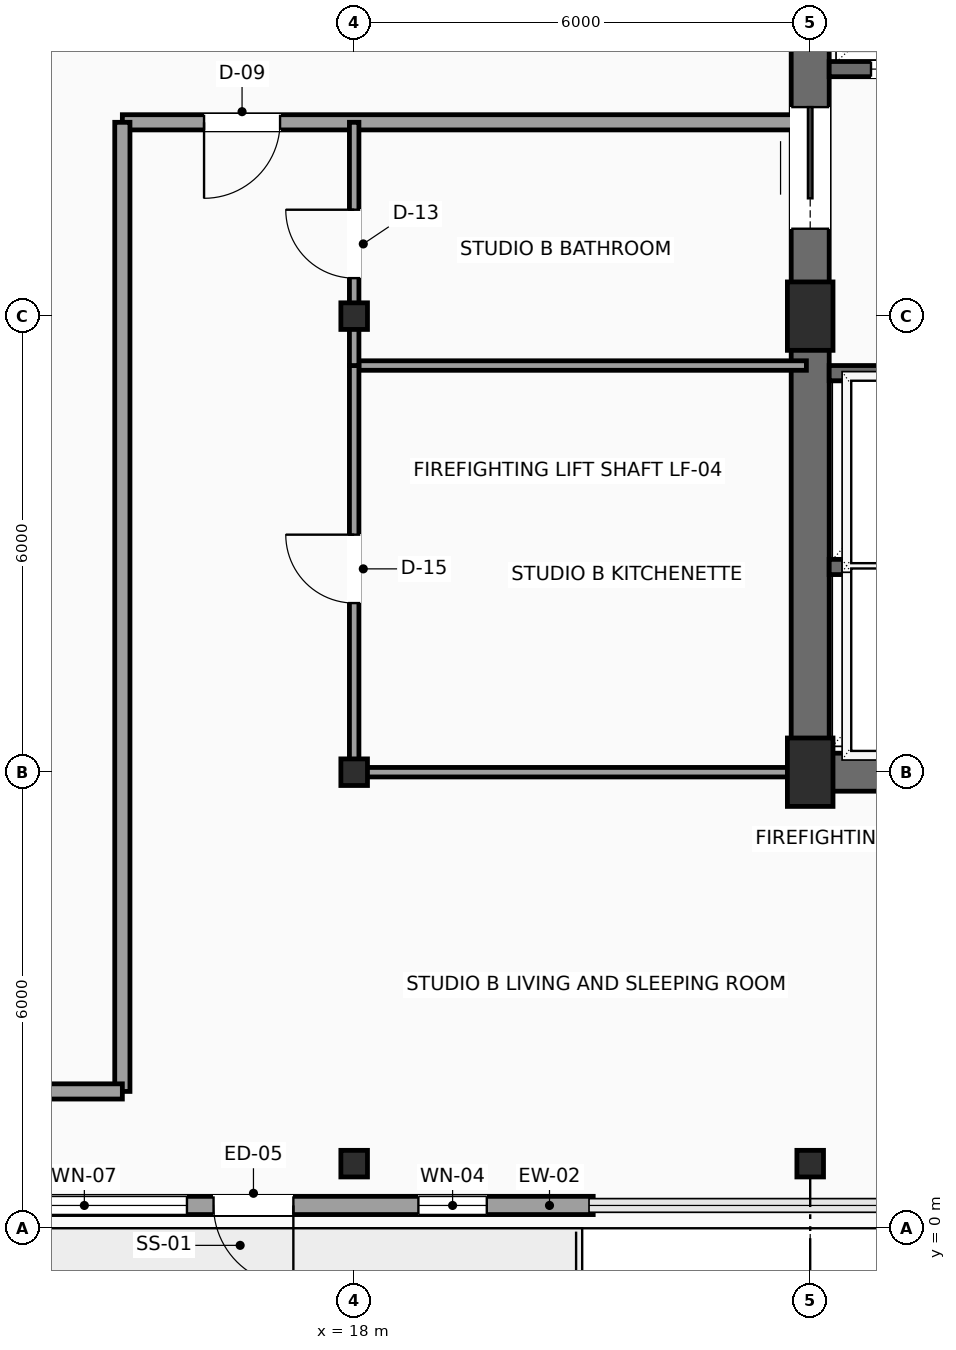
"""IFC4 building model, lengths in metres.
Left out: names, types, materials, properties, quantities, classifications, styles, units other than length and angle.
Written with IfcOpenShell. Run it as: python <this file> out.ifc"""

import sys

from ifc_helpers import new_model, si_unit, direction, frame, frame_2d, origin, origin_2d, place, context, subcontext, project, spatial, rectangle, hollow_rectangle, extrude, element, fill, save


model = new_model("IFC4")
c1 = context("Model", 3, precision=1e-05, world=origin(), true_north=direction((0.0, 1.0)))
c2 = subcontext(c1, "Body", "Model", "MODEL_VIEW")
j1 = project(units=[si_unit("LENGTHUNIT", "METRE"), si_unit("PLANEANGLEUNIT", "RADIAN")], contexts=[c1])
p1 = place(None, origin())
s1 = spatial("IfcSite", under=j1, at=p1, CompositionType="ELEMENT")
p2 = place(p1, origin())
s2 = spatial("IfcBuilding", under=s1, at=p2, CompositionType="ELEMENT")
p3 = place(p2, frame((0.0, 0.0, 239.7)))
s3 = spatial("IfcBuildingStorey", under=s2, at=p3, CompositionType="ELEMENT", Elevation=239.7)
for number, where, z_axis, x_axis in (
    (1, (24.0, 6.0, 0.0), (0.0, 0.0, 1.0), (1.0, 0.0, 0.0)),
    (2, (24.0, 12.0, 0.0), (0.0, 0.0, 1.0), (1.0, 0.0, 0.0)),
):
    element("IfcColumn", number, at=place(p3, frame(where, z_axis=z_axis, x_axis=x_axis)), inside=s3, PredefinedType="COLUMN", context=c2, shape_type="SweptSolid", body=[
        extrude(rectangle(XDim=0.6, YDim=0.9, at=origin_2d()), origin(), (0.0, 0.0, 1.0), 3.5),
    ])
for number, where, z_axis, x_axis in (
    (3, (18.0, 0.85, 0.0), (0.0, 0.0, 1.0), (1.0, 0.0, 0.0)),
    (4, (18.0, 6.0, 0.0), (0.0, 0.0, 1.0), (1.0, 0.0, 0.0)),
    (5, (18.0, 12.0, 0.0), (0.0, 0.0, 1.0), (1.0, 0.0, 0.0)),
    (6, (24.0, 0.85, 0.0), (0.0, 0.0, 1.0), (1.0, 0.0, 0.0)),
):
    element("IfcColumn", number, at=place(p3, frame(where, z_axis=z_axis, x_axis=x_axis)), inside=s3, PredefinedType="COLUMN", context=c2, shape_type="SweptSolid", body=[
        extrude(hollow_rectangle(XDim=0.35, YDim=0.35, WallThickness=0.016, InnerFilletRadius=0.016, OuterFilletRadius=0.032, at=origin_2d()), origin(), (0.0, 0.0, 1.0), 3.5),
    ])
p4 = place(p3, frame((21.145, 0.3, 0.0), z_axis=(0.0, 0.0, 1.0), x_axis=(-1.0, 0.0, 0.0)))
e7 = element("IfcWall", 7, at=p4, inside=s3, PredefinedType="SOLIDWALL", context=c2, shape_type="SweptSolid", body=[
    extrude(rectangle(XDim=9.29, YDim=0.24, at=frame_2d((4.645, 0.0))), origin(), (0.0, 0.0, 1.0), 3.3),
])
p5 = place(p4, frame((3.945, 0.0, 0.0)))
e8 = element("IfcOpeningElement", 8, at=p5, cuts=e7, PredefinedType="OPENING", context=c2, shape_type="SweptSolid", body=[
    extrude(rectangle(XDim=1.05, YDim=2.2, at=frame_2d((0.525, 1.1))), frame((0.0, 0.13, 0.0), z_axis=(0.0, -1.0, 0.0), x_axis=(1.0, 0.0, 0.0)), (0.0, 0.0, 1.0), 0.26),
])
p6 = place(p4, frame((5.345, 0.0, 0.6)))
e9 = element("IfcOpeningElement", 9, at=p6, cuts=e7, PredefinedType="OPENING", context=c2, shape_type="SweptSolid", body=[
    extrude(rectangle(XDim=2.7, YDim=2.3, at=frame_2d((1.35, 1.15))), frame((0.0, 0.13, 0.0), z_axis=(0.0, -1.0, 0.0), x_axis=(1.0, 0.0, 0.0)), (0.0, 0.0, 1.0), 0.26),
])
p7 = place(p4, frame((1.4, 0.0, 0.6)))
e10 = element("IfcOpeningElement", 10, at=p7, cuts=e7, PredefinedType="OPENING", context=c2, shape_type="SweptSolid", body=[
    extrude(rectangle(XDim=0.9, YDim=2.2, at=frame_2d((0.45, 1.1))), frame((0.0, 0.13, 0.0), z_axis=(0.0, -1.0, 0.0), x_axis=(1.0, 0.0, 0.0)), (0.0, 0.0, 1.0), 0.26),
])
p8 = place(p3, frame((24.0, 6.0, 0.0), z_axis=(0.0, 0.0, 1.0), x_axis=(1.0, 0.0, 0.0)))
e11 = element("IfcWall", 11, at=p8, inside=s3, PredefinedType="SHEAR", context=c2, shape_type="SweptSolid", body=[
    extrude(rectangle(XDim=9.6, YDim=0.5, at=frame_2d((4.8, 0.0))), origin(), (0.0, 0.0, 1.0), 3.3),
])
p9 = place(p3, frame((24.0, 6.0, 0.0), z_axis=(0.0, 0.0, 1.0), x_axis=(0.0, 1.0, 0.0)))
e12 = element("IfcWall", 12, at=p9, inside=s3, PredefinedType="SHEAR", context=c2, shape_type="SweptSolid", body=[
    extrude(rectangle(XDim=12.0, YDim=0.5, at=frame_2d((6.0, 0.0))), origin(), (0.0, 0.0, 1.0), 3.3),
])
p10 = place(p9, frame((7.15, 0.0, 0.0)))
e13 = element("IfcOpeningElement", 13, at=p10, cuts=e12, PredefinedType="OPENING", context=c2, shape_type="SweptSolid", body=[
    extrude(rectangle(XDim=1.6, YDim=2.3, at=frame_2d((0.8, 1.15))), frame((0.0, 0.26, 0.0), z_axis=(0.0, -1.0, 0.0), x_axis=(1.0, 0.0, 0.0)), (0.0, 0.0, 1.0), 0.52),
])
for number, where, z_axis, x_axis in (
    (14, (24.25, 8.7, 0.0), (0.0, 0.0, 1.0), (1.0, 0.0, 0.0)),
    (15, (24.25, 11.25, 0.0), (0.0, 0.0, 1.0), (1.0, 0.0, 0.0)),
):
    element("IfcWall", number, at=place(p3, frame(where, z_axis=z_axis, x_axis=x_axis)), inside=s3, PredefinedType="SHEAR", context=c2, shape_type="SweptSolid", body=[
        extrude(rectangle(XDim=2.17, YDim=0.2, at=frame_2d((1.085, 0.0))), origin(), (0.0, 0.0, 1.0), 3.3),
    ])
p11 = place(p3, frame((24.25, 15.25, 0.0), z_axis=(0.0, 0.0, 1.0), x_axis=(1.0, 0.0, 0.0)))
e16 = element("IfcWall", 16, at=p11, inside=s3, PredefinedType="SHEAR", context=c2, shape_type="SweptSolid", body=[
    extrude(rectangle(XDim=5.2, YDim=0.2, at=frame_2d((2.6, 0.0))), origin(), (0.0, 0.0, 1.0), 3.3),
])
p12 = place(p11, frame((0.55, 0.0, 0.0)))
e17 = element("IfcOpeningElement", 17, at=p12, cuts=e16, PredefinedType="OPENING", context=c2, shape_type="SweptSolid", body=[
    extrude(rectangle(XDim=1.2, YDim=2.2, at=frame_2d((0.6, 1.1))), frame((0.0, 0.11, 0.0), z_axis=(0.0, -1.0, 0.0), x_axis=(1.0, 0.0, 0.0)), (0.0, 0.0, 1.0), 0.22),
])
p13 = place(p11, frame((3.15, 0.0, 0.0)))
e18 = element("IfcOpeningElement", 18, at=p13, cuts=e16, PredefinedType="OPENING", context=c2, shape_type="SweptSolid", body=[
    extrude(rectangle(XDim=1.2, YDim=2.2, at=frame_2d((0.6, 1.1))), frame((0.0, 0.11, 0.0), z_axis=(0.0, -1.0, 0.0), x_axis=(1.0, 0.0, 0.0)), (0.0, 0.0, 1.0), 0.22),
])
p14 = place(p3, frame((23.95, 14.55, 0.0), z_axis=(0.0, 0.0, 1.0), x_axis=(-1.0, 0.0, 0.0)))
e19 = element("IfcWall", 19, at=p14, inside=s3, PredefinedType="PARTITIONING", context=c2, shape_type="SweptSolid", body=[
    extrude(rectangle(XDim=9.0, YDim=0.2, at=frame_2d((4.5, 0.0))), origin(), (0.0, 0.0, 1.0), 3.3),
])
p15 = place(p14, frame((6.925, 0.0, 0.0)))
e20 = element("IfcOpeningElement", 20, at=p15, cuts=e19, PredefinedType="OPENING", context=c2, shape_type="SweptSolid", body=[
    extrude(rectangle(XDim=1.0, YDim=2.2, at=frame_2d((0.5, 1.1))), frame((0.0, 0.11, 0.0), z_axis=(0.0, -1.0, 0.0), x_axis=(1.0, 0.0, 0.0)), (0.0, 0.0, 1.0), 0.22),
])
p16 = place(p3, frame((14.95, 14.55, 0.0), z_axis=(0.0, 0.0, 1.0), x_axis=(0.0, -1.0, 0.0)))
e21 = element("IfcWall", 21, at=p16, inside=s3, PredefinedType="PARTITIONING", context=c2, shape_type="SweptSolid", body=[
    extrude(rectangle(XDim=12.75, YDim=0.2, at=frame_2d((6.375, 0.0))), origin(), (0.0, 0.0, 1.0), 3.3),
])
p17 = place(p3, frame((14.95, 1.8, 0.0), z_axis=(0.0, 0.0, 1.0), x_axis=(-1.0, 0.0, 0.0)))
e22 = element("IfcWall", 22, at=p17, inside=s3, PredefinedType="PARTITIONING", context=c2, shape_type="SweptSolid", body=[
    extrude(rectangle(XDim=2.35, YDim=0.2, at=frame_2d((1.175, 0.0))), origin(), (0.0, 0.0, 1.0), 3.3),
])
p18 = place(p3, frame((18.0, 6.0, 0.0), z_axis=(0.0, 0.0, 1.0), x_axis=(1.0, 0.0, 0.0)))
e23 = element("IfcWall", 23, at=p18, inside=s3, PredefinedType="PARTITIONING", context=c2, shape_type="SweptSolid", body=[
    extrude(rectangle(XDim=5.95, YDim=0.125, at=frame_2d((2.975, 0.0))), origin(), (0.0, 0.0, 1.0), 2.992),
])
p19 = place(p3, frame((18.0, 11.35, 0.0), z_axis=(0.0, 0.0, 1.0), x_axis=(1.0, 0.0, 0.0)))
e24 = element("IfcWall", 24, at=p19, inside=s3, PredefinedType="PARTITIONING", context=c2, shape_type="SweptSolid", body=[
    extrude(rectangle(XDim=5.95, YDim=0.125, at=frame_2d((2.975, 0.0))), origin(), (0.0, 0.0, 1.0), 3.3),
])
p20 = place(p3, frame((18.0, 6.0, 0.0), z_axis=(0.0, 0.0, 1.0), x_axis=(0.0, 1.0, 0.0)))
e25 = element("IfcWall", 25, at=p20, inside=s3, PredefinedType="PARTITIONING", context=c2, shape_type="SweptSolid", body=[
    extrude(rectangle(XDim=5.35, YDim=0.125, at=frame_2d((2.675, 0.0))), origin(), (0.0, 0.0, 1.0), 2.992),
])
p21 = place(p20, frame((2.225, 0.0, 0.0)))
e26 = element("IfcOpeningElement", 26, at=p21, cuts=e25, PredefinedType="OPENING", context=c2, shape_type="SweptSolid", body=[
    extrude(rectangle(XDim=0.9, YDim=2.1, at=frame_2d((0.45, 1.05))), frame((0.0, 0.073, 0.0), z_axis=(0.0, -1.0, 0.0), x_axis=(1.0, 0.0, 0.0)), (0.0, 0.0, 1.0), 0.145),
])
p22 = place(p3, frame((18.0, 11.35, 0.0), z_axis=(0.0, 0.0, 1.0), x_axis=(0.0, 1.0, 0.0)))
e27 = element("IfcWall", 27, at=p22, inside=s3, PredefinedType="PARTITIONING", context=c2, shape_type="SweptSolid", body=[
    extrude(rectangle(XDim=3.2, YDim=0.125, at=frame_2d((1.6, 0.0))), origin(), (0.0, 0.0, 1.0), 2.992),
])
p23 = place(p22, frame((1.15, 0.0, 0.0)))
e28 = element("IfcOpeningElement", 28, at=p23, cuts=e27, PredefinedType="OPENING", context=c2, shape_type="SweptSolid", body=[
    extrude(rectangle(XDim=0.9, YDim=2.1, at=frame_2d((0.45, 1.05))), frame((0.0, 0.073, 0.0), z_axis=(0.0, -1.0, 0.0), x_axis=(1.0, 0.0, 0.0)), (0.0, 0.0, 1.0), 0.145),
])
p24 = place(p5, origin())
e29 = element("IfcDoor", 29, at=p24, inside=s3, OperationType="SINGLE_SWING_LEFT", PredefinedType="DOOR", context=c2, shape_type="SweptSolid", body=[
    extrude(rectangle(XDim=1.05, YDim=2.2, at=frame_2d((0.525, 1.1))), frame((0.0, 0.025, 0.0), z_axis=(0.0, -1.0, 0.0), x_axis=(1.0, 0.0, 0.0)), (0.0, 0.0, 1.0), 0.05),
])
fill(e8, e29)
p25 = place(p6, origin())
e30 = element("IfcWindow", 30, at=p25, inside=s3, PartitioningType="SINGLE_PANEL", PredefinedType="WINDOW", context=c2, shape_type="SweptSolid", body=[
    extrude(rectangle(XDim=2.7, YDim=2.3, at=frame_2d((1.35, 1.15))), frame((0.0, 0.03, 0.0), z_axis=(0.0, -1.0, 0.0), x_axis=(1.0, 0.0, 0.0)), (0.0, 0.0, 1.0), 0.06),
])
fill(e9, e30)
p26 = place(p7, origin())
e31 = element("IfcWindow", 31, at=p26, inside=s3, PartitioningType="SINGLE_PANEL", PredefinedType="WINDOW", context=c2, shape_type="SweptSolid", body=[
    extrude(rectangle(XDim=0.9, YDim=2.2, at=frame_2d((0.45, 1.1))), frame((0.0, 0.03, 0.0), z_axis=(0.0, -1.0, 0.0), x_axis=(1.0, 0.0, 0.0)), (0.0, 0.0, 1.0), 0.06),
])
fill(e10, e31)
p27 = place(p10, origin())
e32 = element("IfcDoor", 32, at=p27, inside=s3, OperationType="DOUBLE_DOOR_SLIDING", PredefinedType="DOOR", context=c2, shape_type="SweptSolid", body=[
    extrude(rectangle(XDim=1.6, YDim=2.3, at=frame_2d((0.8, 1.15))), frame((0.0, 0.025, 0.0), z_axis=(0.0, -1.0, 0.0), x_axis=(1.0, 0.0, 0.0)), (0.0, 0.0, 1.0), 0.05),
])
fill(e13, e32)
p28 = place(p12, origin())
e33 = element("IfcDoor", 33, at=p28, inside=s3, OperationType="SLIDING_TO_RIGHT", PredefinedType="DOOR", context=c2, shape_type="SweptSolid", body=[
    extrude(rectangle(XDim=1.2, YDim=2.2, at=frame_2d((0.6, 1.1))), frame((0.0, 0.025, 0.0), z_axis=(0.0, -1.0, 0.0), x_axis=(1.0, 0.0, 0.0)), (0.0, 0.0, 1.0), 0.05),
])
fill(e17, e33)
p29 = place(p15, origin())
e34 = element("IfcDoor", 34, at=p29, inside=s3, OperationType="SINGLE_SWING_RIGHT", PredefinedType="DOOR", context=c2, shape_type="SweptSolid", body=[
    extrude(rectangle(XDim=1.0, YDim=2.2, at=frame_2d((0.5, 1.1))), frame((0.0, 0.025, 0.0), z_axis=(0.0, -1.0, 0.0), x_axis=(1.0, 0.0, 0.0)), (0.0, 0.0, 1.0), 0.05),
])
fill(e20, e34)
p30 = place(p21, origin())
e35 = element("IfcDoor", 35, at=p30, inside=s3, OperationType="SINGLE_SWING_RIGHT", PredefinedType="DOOR", context=c2, shape_type="SweptSolid", body=[
    extrude(rectangle(XDim=0.9, YDim=2.1, at=frame_2d((0.45, 1.05))), frame((0.0, 0.025, 0.0), z_axis=(0.0, -1.0, 0.0), x_axis=(1.0, 0.0, 0.0)), (0.0, 0.0, 1.0), 0.05),
])
fill(e26, e35)
p31 = place(p23, origin())
e36 = element("IfcDoor", 36, at=p31, inside=s3, OperationType="SINGLE_SWING_RIGHT", PredefinedType="DOOR", context=c2, shape_type="SweptSolid", body=[
    extrude(rectangle(XDim=0.9, YDim=2.1, at=frame_2d((0.45, 1.05))), frame((0.0, 0.025, 0.0), z_axis=(0.0, -1.0, 0.0), x_axis=(1.0, 0.0, 0.0)), (0.0, 0.0, 1.0), 0.05),
])
fill(e28, e36)
save(model, sys.argv[1])
